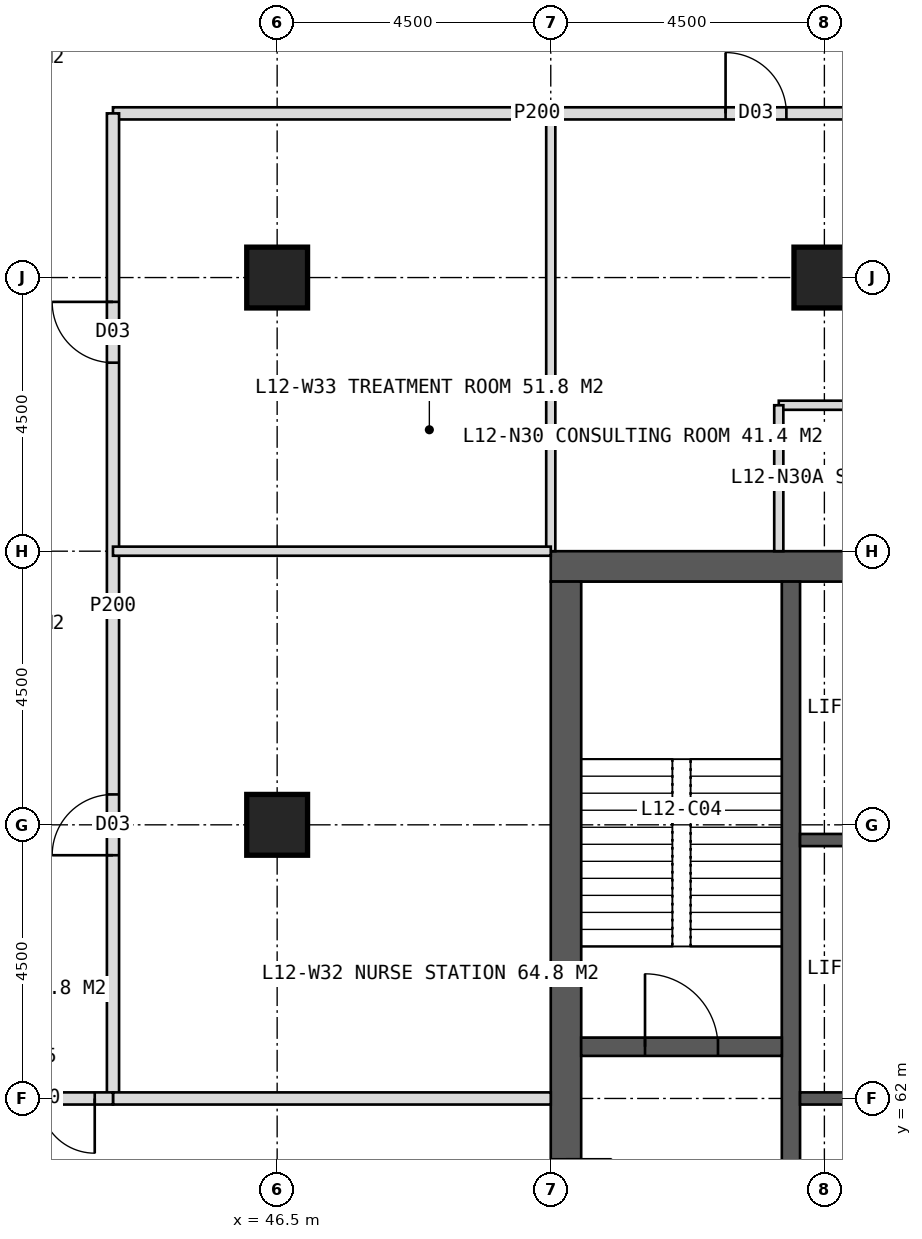
"""IFC4 building model, lengths in metres.
Left out: names, types, materials, properties, quantities, classifications, styles, units other than length and angle.
Written with IfcOpenShell. Run it as: python <this file> out.ifc"""

import sys

from ifc_helpers import new_model, si_unit, direction, frame, frame_2d, origin, origin_2d, place, context, subcontext, project, spatial, rectangle, hollow_rectangle, extrude, element, fill, save


model = new_model("IFC4")
c1 = context("Model", 3, precision=1e-05, world=origin(), true_north=direction((0.0, 1.0)))
c2 = subcontext(c1, "Body", "Model", "MODEL_VIEW")
j1 = project(units=[si_unit("LENGTHUNIT", "METRE"), si_unit("PLANEANGLEUNIT", "RADIAN")], contexts=[c1])
p1 = place(None, origin())
s1 = spatial("IfcSite", under=j1, at=p1, CompositionType="ELEMENT")
p2 = place(p1, origin())
s2 = spatial("IfcBuilding", under=s1, at=p2, CompositionType="ELEMENT")
p3 = place(p2, frame((0.0, 0.0, 55.0)))
s3 = spatial("IfcBuildingStorey", under=s2, at=p3, CompositionType="ELEMENT", Elevation=55.0)
p4 = place(p3, frame((51.0, 70.75, 0.0), z_axis=(0.0, 0.0, 1.0), x_axis=(1.0, 0.0, 0.0)))
e1 = element("IfcWall", 1, at=p4, inside=s3, PredefinedType="SHEAR", context=c2, shape_type="SweptSolid", body=[
    extrude(rectangle(XDim=18.0, YDim=0.5, at=frame_2d((9.0, 0.0))), origin(), (0.0, 0.0, 1.0), 4.0),
])
p5 = place(p4, frame((8.1, 0.0, 0.0)))
e2 = element("IfcOpeningElement", 2, at=p5, cuts=e1, PredefinedType="OPENING", context=c2, shape_type="SweptSolid", body=[
    extrude(rectangle(XDim=1.8, YDim=2.2, at=frame_2d((0.9, 1.1))), frame((0.0, 0.26, 0.0), z_axis=(0.0, -1.0, 0.0), x_axis=(1.0, 0.0, 0.0)), (0.0, 0.0, 1.0), 0.52),
])
p6 = place(p3, frame((51.25, 53.5, 0.0), z_axis=(0.0, 0.0, 1.0), x_axis=(0.0, 1.0, 0.0)))
e3 = element("IfcWall", 3, at=p6, inside=s3, PredefinedType="SHEAR", context=c2, shape_type="SweptSolid", body=[
    extrude(rectangle(XDim=17.0, YDim=0.5, at=frame_2d((8.5, 0.0))), origin(), (0.0, 0.0, 1.0), 4.0),
])
p7 = place(p6, frame((6.0, 0.0, 0.0)))
e4 = element("IfcOpeningElement", 4, at=p7, cuts=e3, PredefinedType="OPENING", context=c2, shape_type="SweptSolid", body=[
    extrude(rectangle(XDim=1.5, YDim=2.2, at=frame_2d((0.75, 1.1))), frame((0.0, 0.26, 0.0), z_axis=(0.0, -1.0, 0.0), x_axis=(1.0, 0.0, 0.0)), (0.0, 0.0, 1.0), 0.52),
])
p8 = place(p3, frame((54.95, 53.5, 0.0), z_axis=(0.0, 0.0, 1.0), x_axis=(0.0, 1.0, 0.0)))
e5 = element("IfcWall", 5, at=p8, inside=s3, PredefinedType="SHEAR", context=c2, shape_type="SweptSolid", body=[
    extrude(rectangle(XDim=17.0, YDim=0.3, at=frame_2d((8.5, 0.0))), origin(), (0.0, 0.0, 1.0), 4.0),
])
for number, where, z_axis, x_axis in (
    (6, (55.1, 62.0, 0.0), (0.0, 0.0, 1.0), (1.0, 0.0, 0.0)),
    (7, (55.1, 66.25, 0.0), (0.0, 0.0, 1.0), (1.0, 0.0, 0.0)),
):
    element("IfcWall", number, at=place(p3, frame(where, z_axis=z_axis, x_axis=x_axis)), inside=s3, PredefinedType="SHEAR", context=c2, shape_type="SweptSolid", body=[
        extrude(rectangle(XDim=3.05, YDim=0.2, at=frame_2d((1.525, 0.0))), origin(), (0.0, 0.0, 1.0), 4.0),
    ])
p9 = place(p3, frame((51.5, 62.85, 0.0), z_axis=(0.0, 0.0, 1.0), x_axis=(1.0, 0.0, 0.0)))
e8 = element("IfcWall", 8, at=p9, inside=s3, PredefinedType="SHEAR", context=c2, shape_type="SweptSolid", body=[
    extrude(rectangle(XDim=3.3, YDim=0.3, at=frame_2d((1.65, 0.0))), origin(), (0.0, 0.0, 1.0), 4.0),
])
p10 = place(p9, frame((1.05, 0.0, 0.0)))
e9 = element("IfcOpeningElement", 9, at=p10, cuts=e8, PredefinedType="OPENING", context=c2, shape_type="SweptSolid", body=[
    extrude(rectangle(XDim=1.2, YDim=2.1, at=frame_2d((0.6, 1.05))), frame((0.0, 0.16, 0.0), z_axis=(0.0, -1.0, 0.0), x_axis=(1.0, 0.0, 0.0)), (0.0, 0.0, 1.0), 0.32),
])
for number, where, z_axis, x_axis in (
    (10, (46.5, 75.5, 0.0), (0.0, 0.0, 1.0), (1.0, 0.0, 0.0)),
    (11, (55.5, 75.5, 0.0), (0.0, 0.0, 1.0), (1.0, 0.0, 0.0)),
    (12, (46.5, 66.5, 0.0), (0.0, 0.0, 1.0), (1.0, 0.0, 0.0)),
):
    element("IfcColumn", number, at=place(p3, frame(where, z_axis=z_axis, x_axis=x_axis)), inside=s3, PredefinedType="COLUMN", context=c2, shape_type="SweptSolid", body=[
        extrude(hollow_rectangle(XDim=1.0, YDim=1.0, WallThickness=0.1, at=origin_2d()), origin(), (0.0, 0.0, 1.0), 4.0),
    ])
p11 = place(p3, frame((51.0, 71.0, 0.0), z_axis=(0.0, 0.0, 1.0), x_axis=(0.0, 1.0, 0.0)))
e13 = element("IfcWall", 13, at=p11, inside=s3, PredefinedType="PARTITIONING", context=c2, shape_type="SweptSolid", body=[
    extrude(rectangle(XDim=7.2, YDim=0.15, at=frame_2d((3.6, 0.0))), origin(), (0.0, 0.0, 1.0), 3.75),
])
p12 = place(p3, frame((43.8, 78.2, 0.0), z_axis=(0.0, 0.0, 1.0), x_axis=(1.0, 0.0, 0.0)))
e14 = element("IfcWall", 14, at=p12, inside=s3, PredefinedType="PARTITIONING", context=c2, shape_type="SweptSolid", body=[
    extrude(rectangle(XDim=13.95, YDim=0.2, at=frame_2d((6.975, 0.0))), origin(), (0.0, 0.0, 1.0), 3.75),
])
p13 = place(p12, frame((10.075, 0.0, 0.0)))
e15 = element("IfcOpeningElement", 15, at=p13, cuts=e14, PredefinedType="OPENING", context=c2, shape_type="SweptSolid", body=[
    extrude(rectangle(XDim=1.0, YDim=2.1, at=frame_2d((0.5, 1.05))), frame((0.0, 0.11, 0.0), z_axis=(0.0, -1.0, 0.0), x_axis=(1.0, 0.0, 0.0)), (0.0, 0.0, 1.0), 0.22),
])
p14 = place(p3, frame((54.75, 73.4, 0.0), z_axis=(0.0, 0.0, 1.0), x_axis=(1.0, 0.0, 0.0)))
e16 = element("IfcWall", 16, at=p14, inside=s3, PredefinedType="PARTITIONING", context=c2, shape_type="SweptSolid", body=[
    extrude(rectangle(XDim=3.0, YDim=0.15, at=frame_2d((1.5, 0.0))), origin(), (0.0, 0.0, 1.0), 3.75),
])
p15 = place(p3, frame((54.75, 71.0, 0.0), z_axis=(0.0, 0.0, 1.0), x_axis=(0.0, 1.0, 0.0)))
e17 = element("IfcWall", 17, at=p15, inside=s3, PredefinedType="PARTITIONING", context=c2, shape_type="SweptSolid", body=[
    extrude(rectangle(XDim=2.4, YDim=0.15, at=frame_2d((1.2, 0.0))), origin(), (0.0, 0.0, 1.0), 3.75),
])
p16 = place(p3, frame((43.8, 62.0, 0.0), z_axis=(0.0, 0.0, 1.0), x_axis=(0.0, 1.0, 0.0)))
e18 = element("IfcWall", 18, at=p16, inside=s3, PredefinedType="PARTITIONING", context=c2, shape_type="SweptSolid", body=[
    extrude(rectangle(XDim=16.2, YDim=0.2, at=frame_2d((8.1, 0.0))), origin(), (0.0, 0.0, 1.0), 3.75),
])
p17 = place(p16, frame((4.0, 0.0, 0.0)))
e19 = element("IfcOpeningElement", 19, at=p17, cuts=e18, PredefinedType="OPENING", context=c2, shape_type="SweptSolid", body=[
    extrude(rectangle(XDim=1.0, YDim=2.1, at=frame_2d((0.5, 1.05))), frame((0.0, 0.11, 0.0), z_axis=(0.0, -1.0, 0.0), x_axis=(1.0, 0.0, 0.0)), (0.0, 0.0, 1.0), 0.22),
])
p18 = place(p16, frame((12.1, 0.0, 0.0)))
e20 = element("IfcOpeningElement", 20, at=p18, cuts=e18, PredefinedType="OPENING", context=c2, shape_type="SweptSolid", body=[
    extrude(rectangle(XDim=1.0, YDim=2.1, at=frame_2d((0.5, 1.05))), frame((0.0, 0.11, 0.0), z_axis=(0.0, -1.0, 0.0), x_axis=(1.0, 0.0, 0.0)), (0.0, 0.0, 1.0), 0.22),
])
p19 = place(p3, frame((51.0, 62.0, 0.0), z_axis=(0.0, 0.0, 1.0), x_axis=(-1.0, 0.0, 0.0)))
e21 = element("IfcWall", 21, at=p19, inside=s3, PredefinedType="SOLIDWALL", context=c2, shape_type="SweptSolid", body=[
    extrude(rectangle(XDim=7.2, YDim=0.2, at=frame_2d((3.6, 0.0))), origin(), (0.0, 0.0, 1.0), 2.75),
])
p20 = place(p3, frame((51.0, 71.0, 0.0), z_axis=(0.0, 0.0, 1.0), x_axis=(-1.0, 0.0, 0.0)))
e22 = element("IfcWall", 22, at=p20, inside=s3, PredefinedType="PARTITIONING", context=c2, shape_type="SweptSolid", body=[
    extrude(rectangle(XDim=7.2, YDim=0.15, at=frame_2d((3.6, 0.0))), origin(), (0.0, 0.0, 1.0), 3.75),
])
p21 = place(p3, frame((43.8, 62.0, 0.0), z_axis=(0.0, 0.0, 1.0), x_axis=(-1.0, 0.0, 0.0)))
e23 = element("IfcWall", 23, at=p21, inside=s3, PredefinedType="SOLIDWALL", context=c2, shape_type="SweptSolid", body=[
    extrude(rectangle(XDim=2.7, YDim=0.2, at=frame_2d((1.35, 0.0))), origin(), (0.0, 0.0, 1.0), 2.75),
])
p22 = place(p21, frame((0.3, 0.0, 0.0)))
e24 = element("IfcOpeningElement", 24, at=p22, cuts=e23, PredefinedType="OPENING", context=c2, shape_type="SweptSolid", body=[
    extrude(rectangle(XDim=1.8, YDim=2.2, at=frame_2d((0.9, 1.1))), frame((0.0, 0.11, 0.0), z_axis=(0.0, -1.0, 0.0), x_axis=(1.0, 0.0, 0.0)), (0.0, 0.0, 1.0), 0.22),
])
p23 = place(p13, origin())
e25 = element("IfcDoor", 25, at=p23, inside=s3, OperationType="SINGLE_SWING_LEFT", PredefinedType="DOOR", context=c2, shape_type="SweptSolid", body=[
    extrude(rectangle(XDim=1.0, YDim=2.1, at=frame_2d((0.5, 1.05))), frame((0.0, 0.025, 0.0), z_axis=(0.0, -1.0, 0.0), x_axis=(1.0, 0.0, 0.0)), (0.0, 0.0, 1.0), 0.05),
])
fill(e15, e25)
p24 = place(p17, origin())
e26 = element("IfcDoor", 26, at=p24, inside=s3, OperationType="SINGLE_SWING_LEFT", PredefinedType="DOOR", context=c2, shape_type="SweptSolid", body=[
    extrude(rectangle(XDim=1.0, YDim=2.1, at=frame_2d((0.5, 1.05))), frame((0.0, 0.025, 0.0), z_axis=(0.0, -1.0, 0.0), x_axis=(1.0, 0.0, 0.0)), (0.0, 0.0, 1.0), 0.05),
])
fill(e19, e26)
p25 = place(p18, origin())
e27 = element("IfcDoor", 27, at=p25, inside=s3, OperationType="SINGLE_SWING_RIGHT", PredefinedType="DOOR", context=c2, shape_type="SweptSolid", body=[
    extrude(rectangle(XDim=1.0, YDim=2.1, at=frame_2d((0.5, 1.05))), frame((0.0, 0.025, 0.0), z_axis=(0.0, -1.0, 0.0), x_axis=(1.0, 0.0, 0.0)), (0.0, 0.0, 1.0), 0.05),
])
fill(e20, e27)
p26 = place(p22, origin())
e28 = element("IfcDoor", 28, at=p26, inside=s3, OperationType="DOUBLE_DOOR_DOUBLE_SWING", PredefinedType="DOOR", context=c2, shape_type="SweptSolid", body=[
    extrude(rectangle(XDim=1.8, YDim=2.2, at=frame_2d((0.9, 1.1))), frame((0.0, 0.025, 0.0), z_axis=(0.0, -1.0, 0.0), x_axis=(1.0, 0.0, 0.0)), (0.0, 0.0, 1.0), 0.05),
])
fill(e24, e28)
p27 = place(p10, origin())
e29 = element("IfcDoor", 29, at=p27, inside=s3, OperationType="SINGLE_SWING_LEFT", PredefinedType="DOOR", context=c2, shape_type="SweptSolid", body=[
    extrude(rectangle(XDim=1.2, YDim=2.1, at=frame_2d((0.6, 1.05))), frame((0.0, 0.025, 0.0), z_axis=(0.0, -1.0, 0.0), x_axis=(1.0, 0.0, 0.0)), (0.0, 0.0, 1.0), 0.05),
])
fill(e9, e29)
save(model, sys.argv[1])
